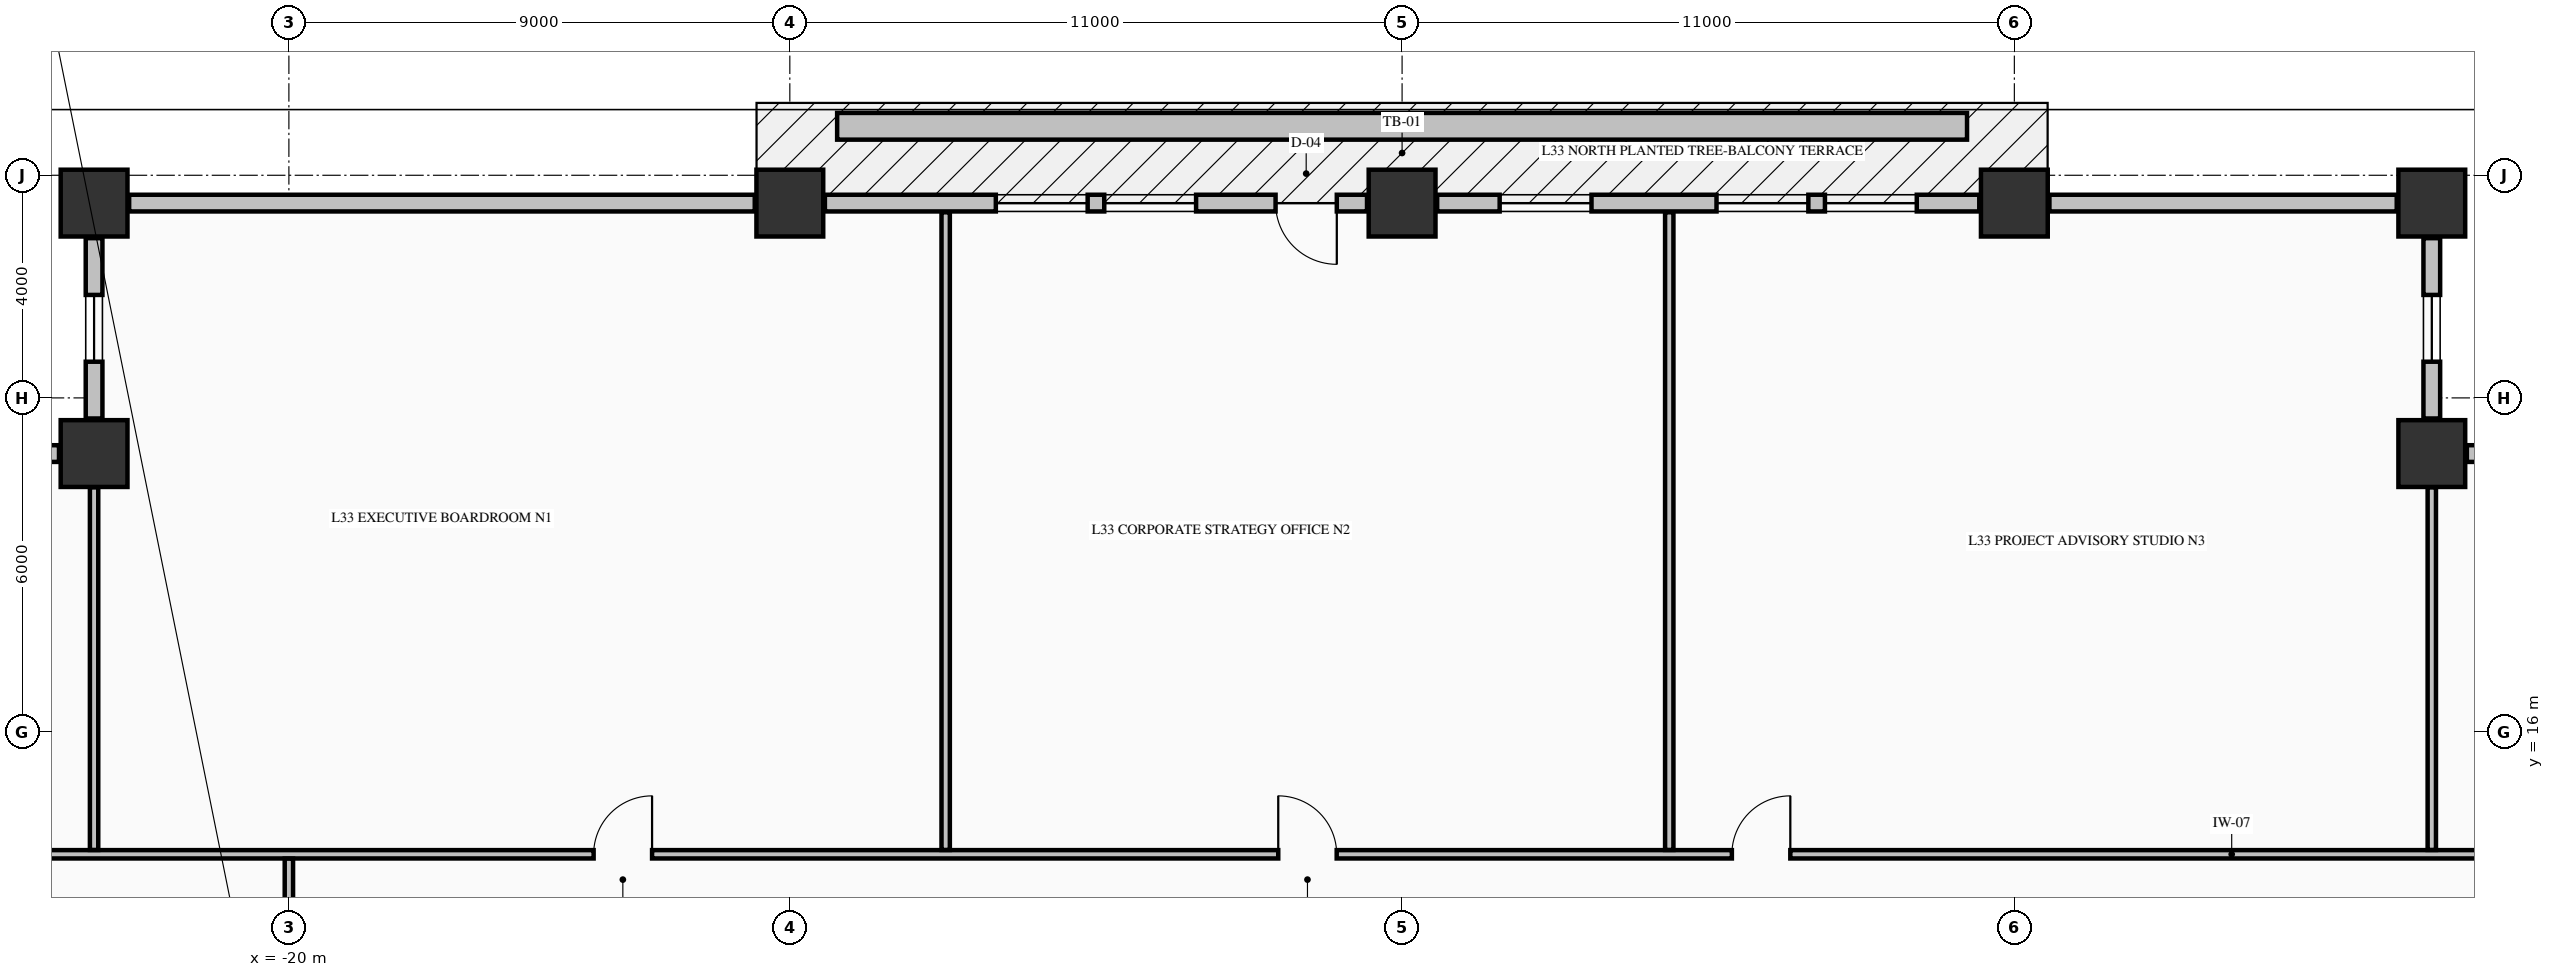
"""IFC4 building model, lengths in metres.
Left out: names, types, materials, properties, quantities, classifications, styles, units other than length and angle.
Written with IfcOpenShell. Run it as: python <this file> out.ifc"""

import sys

from ifc_helpers import new_model, si_unit, direction, frame, frame_2d, origin, origin_2d, place, context, subcontext, project, spatial, rectangle, extrude, element, fill, save


model = new_model("IFC4")
c1 = context("Model", 3, precision=1e-05, world=origin(), true_north=direction((0.0, 1.0)))
c2 = subcontext(c1, "Body", "Model", "MODEL_VIEW")
j1 = project(units=[si_unit("LENGTHUNIT", "METRE"), si_unit("PLANEANGLEUNIT", "RADIAN")], contexts=[c1])
p1 = place(None, origin())
s1 = spatial("IfcSite", under=j1, at=p1, CompositionType="ELEMENT")
p2 = place(p1, origin())
s2 = spatial("IfcBuilding", under=s1, at=p2, CompositionType="ELEMENT")
p3 = place(p2, frame((0.0, 0.0, 132.06)))
s3 = spatial("IfcBuildingStorey", under=s2, at=p3, CompositionType="ELEMENT", Elevation=132.06)
for number, where, z_axis, x_axis in (
    (1, (-23.5, 25.5, -0.25), (0.0, 0.0, 1.0), (1.0, 0.0, 0.0)),
    (2, (-11.0, 25.5, -0.25), (0.0, 0.0, 1.0), (1.0, 0.0, 0.0)),
    (3, (0.0, 25.5, -0.25), (0.0, 0.0, 1.0), (1.0, 0.0, 0.0)),
    (4, (11.0, 25.5, -0.25), (0.0, 0.0, 1.0), (1.0, 0.0, 0.0)),
    (5, (18.5, 25.5, -0.25), (0.0, 0.0, 1.0), (1.0, 0.0, 0.0)),
    (6, (18.5, 21.0, -0.25), (0.0, 0.0, 1.0), (1.0, 0.0, 0.0)),
    (7, (-23.5, 21.0, -0.25), (0.0, 0.0, 1.0), (1.0, 0.0, 0.0)),
):
    element("IfcColumn", number, at=place(p3, frame(where, z_axis=z_axis, x_axis=x_axis)), inside=s3, PredefinedType="COLUMN", context=c2, shape_type="SweptSolid", body=[
        extrude(rectangle(XDim=1.2, YDim=1.2, at=origin_2d()), origin(), (0.0, 0.0, 1.0), 3.57),
    ])
p4 = place(p3, frame((22.37, 21.0, 0.0), z_axis=(0.0, 0.0, 1.0), x_axis=(-1.0, 0.0, 0.0)))
e8 = element("IfcWall", 8, at=p4, inside=s3, PredefinedType="STANDARD", context=c2, shape_type="SweptSolid", body=[
    extrude(rectangle(XDim=3.24, YDim=0.3, at=frame_2d((1.62, 0.0))), origin(), (0.0, 0.0, 1.0), 2.712),
])
p5 = place(p4, frame((1.02, 0.0, 0.82)))
e9 = element("IfcOpeningElement", 9, at=p5, cuts=e8, PredefinedType="OPENING", context=c2, shape_type="SweptSolid", body=[
    extrude(rectangle(XDim=1.2, YDim=1.65, at=frame_2d((0.6, 0.825))), frame((0.0, 0.16, 0.0), z_axis=(0.0, -1.0, 0.0), x_axis=(1.0, 0.0, 0.0)), (0.0, 0.0, 1.0), 0.32),
])
p6 = place(p3, frame((18.5, 21.63, 0.0), z_axis=(0.0, 0.0, 1.0), x_axis=(0.0, 1.0, 0.0)))
e10 = element("IfcWall", 10, at=p6, inside=s3, PredefinedType="STANDARD", context=c2, shape_type="SweptSolid", body=[
    extrude(rectangle(XDim=3.24, YDim=0.3, at=frame_2d((1.62, 0.0))), origin(), (0.0, 0.0, 1.0), 2.712),
])
p7 = place(p6, frame((1.02, 0.0, 0.82)))
e11 = element("IfcOpeningElement", 11, at=p7, cuts=e10, PredefinedType="OPENING", context=c2, shape_type="SweptSolid", body=[
    extrude(rectangle(XDim=1.2, YDim=1.65, at=frame_2d((0.6, 0.825))), frame((0.0, 0.16, 0.0), z_axis=(0.0, -1.0, 0.0), x_axis=(1.0, 0.0, 0.0)), (0.0, 0.0, 1.0), 0.32),
])
p8 = place(p3, frame((-23.5, 24.87, 0.0), z_axis=(0.0, 0.0, 1.0), x_axis=(0.0, -1.0, 0.0)))
e12 = element("IfcWall", 12, at=p8, inside=s3, PredefinedType="STANDARD", context=c2, shape_type="SweptSolid", body=[
    extrude(rectangle(XDim=3.24, YDim=0.3, at=frame_2d((1.62, 0.0))), origin(), (0.0, 0.0, 1.0), 2.712),
])
p9 = place(p8, frame((1.02, 0.0, 0.82)))
e13 = element("IfcOpeningElement", 13, at=p9, cuts=e12, PredefinedType="OPENING", context=c2, shape_type="SweptSolid", body=[
    extrude(rectangle(XDim=1.2, YDim=1.65, at=frame_2d((0.6, 0.825))), frame((0.0, 0.16, 0.0), z_axis=(0.0, -1.0, 0.0), x_axis=(1.0, 0.0, 0.0)), (0.0, 0.0, 1.0), 0.32),
])
p10 = place(p3, frame((-24.13, 21.0, 0.0), z_axis=(0.0, 0.0, 1.0), x_axis=(-1.0, 0.0, 0.0)))
e14 = element("IfcWall", 14, at=p10, inside=s3, PredefinedType="STANDARD", context=c2, shape_type="SweptSolid", body=[
    extrude(rectangle(XDim=3.24, YDim=0.3, at=frame_2d((1.62, 0.0))), origin(), (0.0, 0.0, 1.0), 2.712),
])
p11 = place(p10, frame((1.02, 0.0, 0.82)))
e15 = element("IfcOpeningElement", 15, at=p11, cuts=e14, PredefinedType="OPENING", context=c2, shape_type="SweptSolid", body=[
    extrude(rectangle(XDim=1.2, YDim=1.65, at=frame_2d((0.6, 0.825))), frame((0.0, 0.16, 0.0), z_axis=(0.0, -1.0, 0.0), x_axis=(1.0, 0.0, 0.0)), (0.0, 0.0, 1.0), 0.32),
])
p12 = place(p3, frame((-11.63, 25.5, 0.0), z_axis=(0.0, 0.0, 1.0), x_axis=(-1.0, 0.0, 0.0)))
e16 = element("IfcWall", 16, at=p12, inside=s3, PredefinedType="STANDARD", context=c2, shape_type="SweptSolid", body=[
    extrude(rectangle(XDim=11.24, YDim=0.3, at=frame_2d((5.62, 0.0))), origin(), (0.0, 0.0, 1.0), 2.712),
])
p13 = place(p3, frame((-0.63, 25.5, 0.0), z_axis=(0.0, 0.0, 1.0), x_axis=(-1.0, 0.0, 0.0)))
e17 = element("IfcWall", 17, at=p13, inside=s3, PredefinedType="STANDARD", context=c2, shape_type="SweptSolid", body=[
    extrude(rectangle(XDim=9.74, YDim=0.3, at=frame_2d((4.87, 0.0))), origin(), (0.0, 0.0, 1.0), 2.712),
])
p14 = place(p13, frame((0.543, 0.0, 0.0)))
e18 = element("IfcOpeningElement", 18, at=p14, cuts=e17, PredefinedType="OPENING", context=c2, shape_type="SweptSolid", body=[
    extrude(rectangle(XDim=1.1, YDim=2.15, at=frame_2d((0.55, 1.075))), frame((0.0, 0.16, 0.0), z_axis=(0.0, -1.0, 0.0), x_axis=(1.0, 0.0, 0.0)), (0.0, 0.0, 1.0), 0.32),
])
p15 = place(p13, frame((3.071, 0.0, 0.8)))
e19 = element("IfcOpeningElement", 19, at=p15, cuts=e17, PredefinedType="OPENING", context=c2, shape_type="SweptSolid", body=[
    extrude(rectangle(XDim=1.65, YDim=1.7, at=frame_2d((0.825, 0.85))), frame((0.0, 0.16, 0.0), z_axis=(0.0, -1.0, 0.0), x_axis=(1.0, 0.0, 0.0)), (0.0, 0.0, 1.0), 0.32),
])
p16 = place(p13, frame((5.019, 0.0, 0.8)))
e20 = element("IfcOpeningElement", 20, at=p16, cuts=e17, PredefinedType="OPENING", context=c2, shape_type="SweptSolid", body=[
    extrude(rectangle(XDim=1.65, YDim=1.7, at=frame_2d((0.825, 0.85))), frame((0.0, 0.16, 0.0), z_axis=(0.0, -1.0, 0.0), x_axis=(1.0, 0.0, 0.0)), (0.0, 0.0, 1.0), 0.32),
])
p17 = place(p3, frame((10.37, 25.5, 0.0), z_axis=(0.0, 0.0, 1.0), x_axis=(-1.0, 0.0, 0.0)))
e21 = element("IfcWall", 21, at=p17, inside=s3, PredefinedType="STANDARD", context=c2, shape_type="SweptSolid", body=[
    extrude(rectangle(XDim=9.74, YDim=0.3, at=frame_2d((4.87, 0.0))), origin(), (0.0, 0.0, 1.0), 2.712),
])
p18 = place(p17, frame((1.123, 0.0, 0.8)))
e22 = element("IfcOpeningElement", 22, at=p18, cuts=e21, PredefinedType="OPENING", context=c2, shape_type="SweptSolid", body=[
    extrude(rectangle(XDim=1.65, YDim=1.7, at=frame_2d((0.825, 0.85))), frame((0.0, 0.16, 0.0), z_axis=(0.0, -1.0, 0.0), x_axis=(1.0, 0.0, 0.0)), (0.0, 0.0, 1.0), 0.32),
])
p19 = place(p17, frame((3.071, 0.0, 0.8)))
e23 = element("IfcOpeningElement", 23, at=p19, cuts=e21, PredefinedType="OPENING", context=c2, shape_type="SweptSolid", body=[
    extrude(rectangle(XDim=1.65, YDim=1.7, at=frame_2d((0.825, 0.85))), frame((0.0, 0.16, 0.0), z_axis=(0.0, -1.0, 0.0), x_axis=(1.0, 0.0, 0.0)), (0.0, 0.0, 1.0), 0.32),
])
p20 = place(p17, frame((6.967, 0.0, 0.8)))
e24 = element("IfcOpeningElement", 24, at=p20, cuts=e21, PredefinedType="OPENING", context=c2, shape_type="SweptSolid", body=[
    extrude(rectangle(XDim=1.65, YDim=1.7, at=frame_2d((0.825, 0.85))), frame((0.0, 0.16, 0.0), z_axis=(0.0, -1.0, 0.0), x_axis=(1.0, 0.0, 0.0)), (0.0, 0.0, 1.0), 0.32),
])
p21 = place(p3, frame((17.87, 25.5, 0.0), z_axis=(0.0, 0.0, 1.0), x_axis=(-1.0, 0.0, 0.0)))
e25 = element("IfcWall", 25, at=p21, inside=s3, PredefinedType="STANDARD", context=c2, shape_type="SweptSolid", body=[
    extrude(rectangle(XDim=6.24, YDim=0.3, at=frame_2d((3.12, 0.0))), origin(), (0.0, 0.0, 1.0), 2.712),
])
p22 = place(p3, frame((-27.835, 13.8, 0.0), z_axis=(0.0, 0.0, 1.0), x_axis=(1.0, 0.0, 0.0)))
e26 = element("IfcWall", 26, at=p22, inside=s3, PredefinedType="PARTITIONING", context=c2, shape_type="SweptSolid", body=[
    extrude(rectangle(XDim=50.67, YDim=0.15, at=frame_2d((25.335, 0.0))), origin(), (0.0, 0.0, 1.0), 3.32),
])
p23 = place(p22, frame((13.31, 0.0, 0.0)))
e27 = element("IfcOpeningElement", 27, at=p23, cuts=e26, PredefinedType="OPENING", context=c2, shape_type="SweptSolid", body=[
    extrude(rectangle(XDim=1.05, YDim=2.15, at=frame_2d((0.525, 1.075))), frame((0.0, 0.085, 0.0), z_axis=(0.0, -1.0, 0.0), x_axis=(1.0, 0.0, 0.0)), (0.0, 0.0, 1.0), 0.17),
])
p24 = place(p22, frame((25.61, 0.0, 0.0)))
e28 = element("IfcOpeningElement", 28, at=p24, cuts=e26, PredefinedType="OPENING", context=c2, shape_type="SweptSolid", body=[
    extrude(rectangle(XDim=1.05, YDim=2.15, at=frame_2d((0.525, 1.075))), frame((0.0, 0.085, 0.0), z_axis=(0.0, -1.0, 0.0), x_axis=(1.0, 0.0, 0.0)), (0.0, 0.0, 1.0), 0.17),
])
p25 = place(p22, frame((33.76, 0.0, 0.0)))
e29 = element("IfcOpeningElement", 29, at=p25, cuts=e26, PredefinedType="OPENING", context=c2, shape_type="SweptSolid", body=[
    extrude(rectangle(XDim=1.05, YDim=2.15, at=frame_2d((0.525, 1.075))), frame((0.0, 0.085, 0.0), z_axis=(0.0, -1.0, 0.0), x_axis=(1.0, 0.0, 0.0)), (0.0, 0.0, 1.0), 0.17),
])
p26 = place(p3, frame((-23.5, 13.878, 0.0), z_axis=(0.0, 0.0, 1.0), x_axis=(0.0, 1.0, 0.0)))
e30 = element("IfcWall", 30, at=p26, inside=s3, PredefinedType="PARTITIONING", context=c2, shape_type="SweptSolid", body=[
    extrude(rectangle(XDim=6.516, YDim=0.15, at=frame_2d((3.258, 0.0))), origin(), (0.0, 0.0, 1.0), 3.32),
])
p27 = place(p3, frame((-20.0, 11.006, 0.0), z_axis=(0.0, 0.0, 1.0), x_axis=(0.0, 1.0, 0.0)))
e31 = element("IfcWall", 31, at=p27, inside=s3, PredefinedType="PARTITIONING", context=c2, shape_type="SweptSolid", body=[
    extrude(rectangle(XDim=2.716, YDim=0.15, at=frame_2d((1.358, 0.0))), origin(), (0.0, 0.0, 1.0), 2.81),
])
p28 = place(p27, frame((0.669, 0.0, 0.0)))
e32 = element("IfcOpeningElement", 32, at=p28, cuts=e31, PredefinedType="OPENING", context=c2, shape_type="SweptSolid", body=[
    extrude(rectangle(XDim=0.95, YDim=2.15, at=frame_2d((0.475, 1.075))), frame((0.0, 0.085, 0.0), z_axis=(0.0, -1.0, 0.0), x_axis=(1.0, 0.0, 0.0)), (0.0, 0.0, 1.0), 0.17),
])
for number, where, z_axis, x_axis in (
    (33, (-8.2, 13.878, 0.0), (0.0, 0.0, 1.0), (0.0, 1.0, 0.0)),
    (34, (4.8, 13.878, 0.0), (0.0, 0.0, 1.0), (0.0, 1.0, 0.0)),
):
    element("IfcWall", number, at=place(p3, frame(where, z_axis=z_axis, x_axis=x_axis)), inside=s3, PredefinedType="PARTITIONING", context=c2, shape_type="SweptSolid", body=[
        extrude(rectangle(XDim=11.457, YDim=0.15, at=frame_2d((5.729, 0.0))), origin(), (0.0, 0.0, 1.0), 3.32),
    ])
p29 = place(p3, frame((18.5, 13.878, 0.0), z_axis=(0.0, 0.0, 1.0), x_axis=(0.0, 1.0, 0.0)))
e35 = element("IfcWall", 35, at=p29, inside=s3, PredefinedType="PARTITIONING", context=c2, shape_type="SweptSolid", body=[
    extrude(rectangle(XDim=6.516, YDim=0.15, at=frame_2d((3.258, 0.0))), origin(), (0.0, 0.0, 1.0), 3.32),
])
p30 = place(p3, frame((-10.15, 26.88, -0.04), z_axis=(0.0, 0.0, 1.0), x_axis=(1.0, 0.0, 0.0)))
e36 = element("IfcWall", 36, at=p30, inside=s3, PredefinedType="PARAPET", context=c2, shape_type="SweptSolid", body=[
    extrude(rectangle(XDim=20.3, YDim=0.48, at=frame_2d((10.15, 0.0))), origin(), (0.0, 0.0, 1.0), 0.52),
])
p31 = place(p7, origin())
e37 = element("IfcWindow", 37, at=p31, inside=s3, PartitioningType="SINGLE_PANEL", PredefinedType="WINDOW", context=c2, shape_type="SweptSolid", body=[
    extrude(rectangle(XDim=1.2, YDim=1.65, at=frame_2d((0.6, 0.825))), frame((0.0, 0.03, 0.0), z_axis=(0.0, -1.0, 0.0), x_axis=(1.0, 0.0, 0.0)), (0.0, 0.0, 1.0), 0.06),
])
fill(e11, e37)
p32 = place(p9, origin())
e38 = element("IfcWindow", 38, at=p32, inside=s3, PartitioningType="SINGLE_PANEL", PredefinedType="WINDOW", context=c2, shape_type="SweptSolid", body=[
    extrude(rectangle(XDim=1.2, YDim=1.65, at=frame_2d((0.6, 0.825))), frame((0.0, 0.03, 0.0), z_axis=(0.0, -1.0, 0.0), x_axis=(1.0, 0.0, 0.0)), (0.0, 0.0, 1.0), 0.06),
])
fill(e13, e38)
p33 = place(p14, origin())
e39 = element("IfcDoor", 39, at=p33, inside=s3, OperationType="SINGLE_SWING_LEFT", PredefinedType="DOOR", context=c2, shape_type="SweptSolid", body=[
    extrude(rectangle(XDim=1.1, YDim=2.15, at=frame_2d((0.55, 1.075))), frame((0.0, 0.025, 0.0), z_axis=(0.0, -1.0, 0.0), x_axis=(1.0, 0.0, 0.0)), (0.0, 0.0, 1.0), 0.05),
])
fill(e18, e39)
p34 = place(p15, origin())
e40 = element("IfcWindow", 40, at=p34, inside=s3, PartitioningType="SINGLE_PANEL", PredefinedType="WINDOW", context=c2, shape_type="SweptSolid", body=[
    extrude(rectangle(XDim=1.65, YDim=1.7, at=frame_2d((0.825, 0.85))), frame((0.0, 0.03, 0.0), z_axis=(0.0, -1.0, 0.0), x_axis=(1.0, 0.0, 0.0)), (0.0, 0.0, 1.0), 0.06),
])
fill(e19, e40)
p35 = place(p16, origin())
e41 = element("IfcWindow", 41, at=p35, inside=s3, PartitioningType="SINGLE_PANEL", PredefinedType="WINDOW", context=c2, shape_type="SweptSolid", body=[
    extrude(rectangle(XDim=1.65, YDim=1.7, at=frame_2d((0.825, 0.85))), frame((0.0, 0.03, 0.0), z_axis=(0.0, -1.0, 0.0), x_axis=(1.0, 0.0, 0.0)), (0.0, 0.0, 1.0), 0.06),
])
fill(e20, e41)
p36 = place(p18, origin())
e42 = element("IfcWindow", 42, at=p36, inside=s3, PartitioningType="SINGLE_PANEL", PredefinedType="WINDOW", context=c2, shape_type="SweptSolid", body=[
    extrude(rectangle(XDim=1.65, YDim=1.7, at=frame_2d((0.825, 0.85))), frame((0.0, 0.03, 0.0), z_axis=(0.0, -1.0, 0.0), x_axis=(1.0, 0.0, 0.0)), (0.0, 0.0, 1.0), 0.06),
])
fill(e22, e42)
p37 = place(p19, origin())
e43 = element("IfcWindow", 43, at=p37, inside=s3, PartitioningType="SINGLE_PANEL", PredefinedType="WINDOW", context=c2, shape_type="SweptSolid", body=[
    extrude(rectangle(XDim=1.65, YDim=1.7, at=frame_2d((0.825, 0.85))), frame((0.0, 0.03, 0.0), z_axis=(0.0, -1.0, 0.0), x_axis=(1.0, 0.0, 0.0)), (0.0, 0.0, 1.0), 0.06),
])
fill(e23, e43)
p38 = place(p20, origin())
e44 = element("IfcWindow", 44, at=p38, inside=s3, PartitioningType="SINGLE_PANEL", PredefinedType="WINDOW", context=c2, shape_type="SweptSolid", body=[
    extrude(rectangle(XDim=1.65, YDim=1.7, at=frame_2d((0.825, 0.85))), frame((0.0, 0.03, 0.0), z_axis=(0.0, -1.0, 0.0), x_axis=(1.0, 0.0, 0.0)), (0.0, 0.0, 1.0), 0.06),
])
fill(e24, e44)
p39 = place(p23, origin())
e45 = element("IfcDoor", 45, at=p39, inside=s3, OperationType="SINGLE_SWING_RIGHT", PredefinedType="DOOR", context=c2, shape_type="SweptSolid", body=[
    extrude(rectangle(XDim=1.05, YDim=2.15, at=frame_2d((0.525, 1.075))), frame((0.0, 0.025, 0.0), z_axis=(0.0, -1.0, 0.0), x_axis=(1.0, 0.0, 0.0)), (0.0, 0.0, 1.0), 0.05),
])
fill(e27, e45)
p40 = place(p24, origin())
e46 = element("IfcDoor", 46, at=p40, inside=s3, OperationType="SINGLE_SWING_LEFT", PredefinedType="DOOR", context=c2, shape_type="SweptSolid", body=[
    extrude(rectangle(XDim=1.05, YDim=2.15, at=frame_2d((0.525, 1.075))), frame((0.0, 0.025, 0.0), z_axis=(0.0, -1.0, 0.0), x_axis=(1.0, 0.0, 0.0)), (0.0, 0.0, 1.0), 0.05),
])
fill(e28, e46)
p41 = place(p25, origin())
e47 = element("IfcDoor", 47, at=p41, inside=s3, OperationType="SINGLE_SWING_RIGHT", PredefinedType="DOOR", context=c2, shape_type="SweptSolid", body=[
    extrude(rectangle(XDim=1.05, YDim=2.15, at=frame_2d((0.525, 1.075))), frame((0.0, 0.025, 0.0), z_axis=(0.0, -1.0, 0.0), x_axis=(1.0, 0.0, 0.0)), (0.0, 0.0, 1.0), 0.05),
])
fill(e29, e47)
save(model, sys.argv[1])
